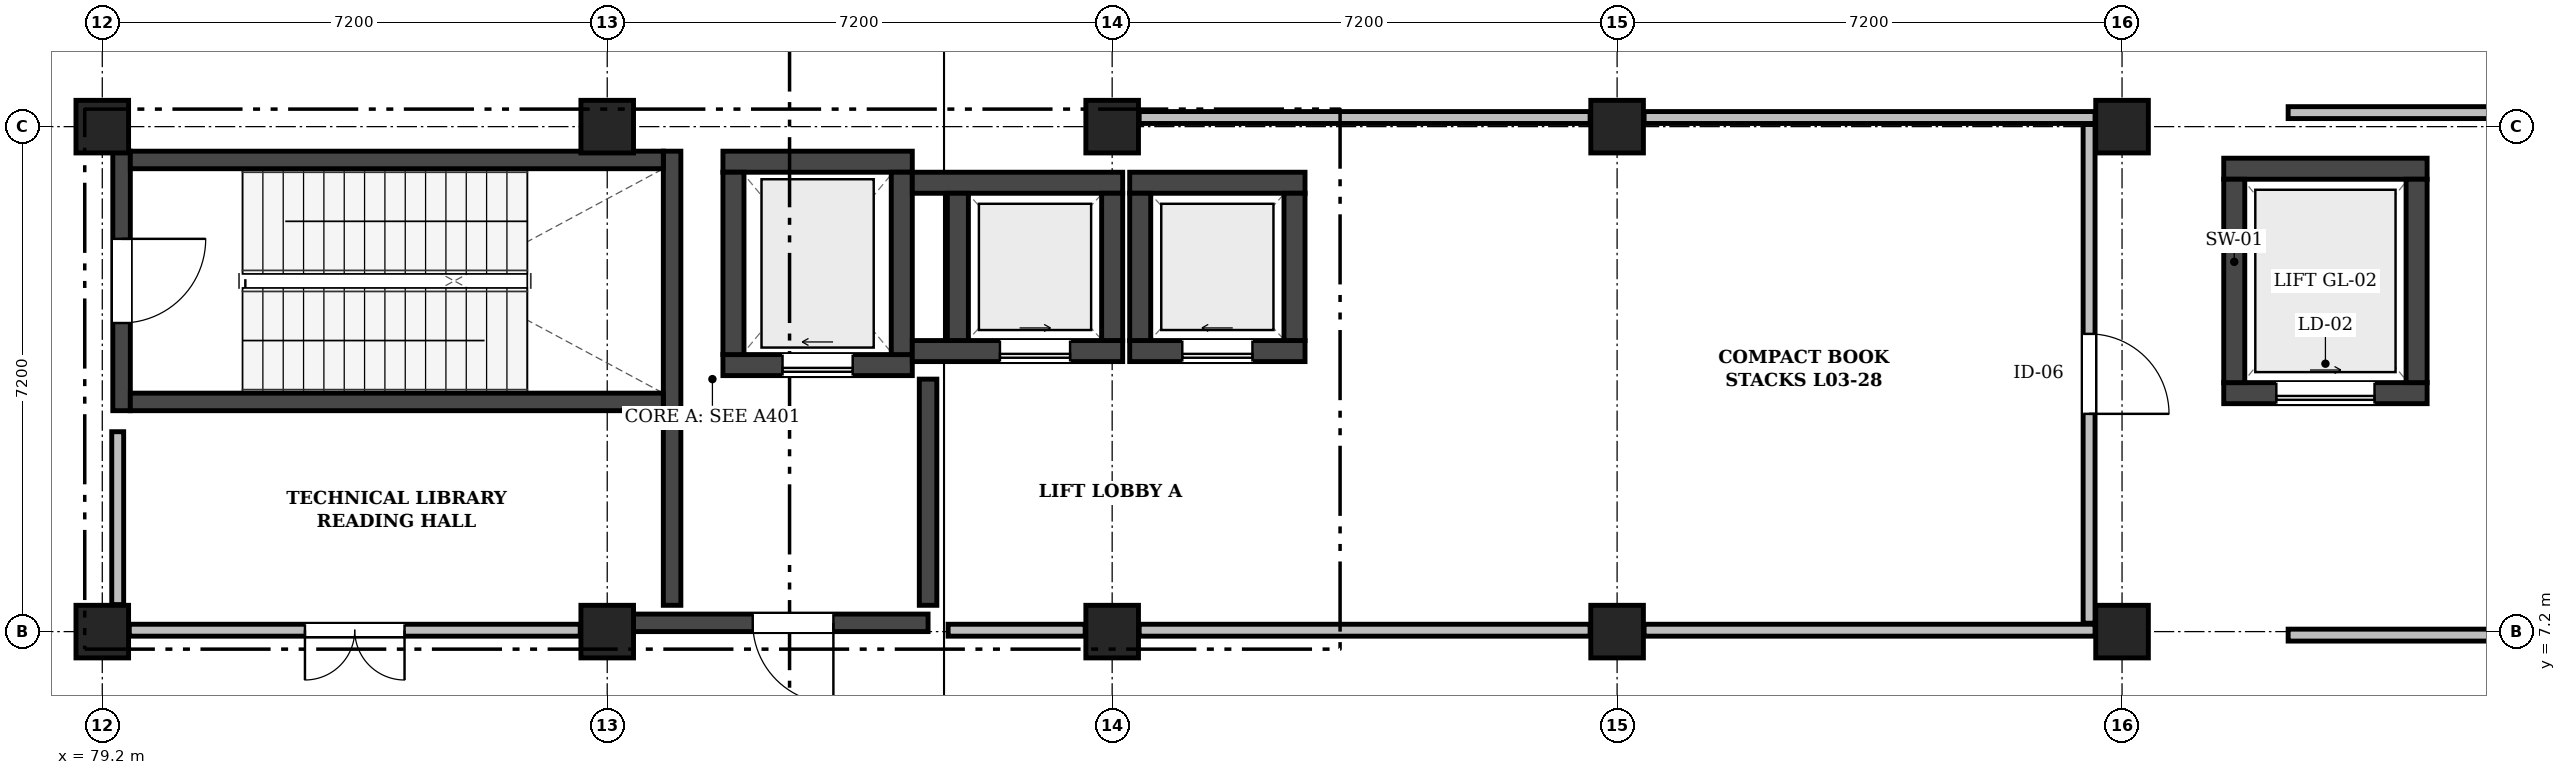
"""IFC4 building model, lengths in metres.
Left out: names, types, materials, properties, quantities, classifications, styles, units other than length and angle.
Written with IfcOpenShell. Run it as: python <this file> out.ifc"""

import sys

from ifc_helpers import new_model, si_unit, direction, frame, frame_2d, origin, origin_2d, place, context, subcontext, project, spatial, rectangle, extrude, element, fill, save


model = new_model("IFC4")
c1 = context("Model", 3, precision=1e-05, world=origin(), true_north=direction((0.0, 1.0)))
c2 = subcontext(c1, "Body", "Model", "MODEL_VIEW")
j1 = project(units=[si_unit("LENGTHUNIT", "METRE"), si_unit("PLANEANGLEUNIT", "RADIAN")], contexts=[c1])
p1 = place(None, origin())
s1 = spatial("IfcSite", under=j1, at=p1, CompositionType="ELEMENT")
p2 = place(p1, origin())
s2 = spatial("IfcBuilding", under=s1, at=p2, CompositionType="ELEMENT")
p3 = place(p2, frame((0.0, 0.0, 14.4)))
s3 = spatial("IfcBuildingStorey", under=s2, at=p3, CompositionType="ELEMENT", Elevation=14.4)
for number, where, z_axis, x_axis in (
    (1, (79.2, 7.2, 0.0), (0.0, 0.0, 1.0), (1.0, 0.0, 0.0)),
    (2, (79.2, 14.4, 0.0), (0.0, 0.0, 1.0), (1.0, 0.0, 0.0)),
    (3, (86.4, 7.2, 0.0), (0.0, 0.0, 1.0), (1.0, 0.0, 0.0)),
    (4, (86.4, 14.4, 0.0), (0.0, 0.0, 1.0), (1.0, 0.0, 0.0)),
    (5, (93.6, 7.2, 0.0), (0.0, 0.0, 1.0), (1.0, 0.0, 0.0)),
    (6, (93.6, 14.4, 0.0), (0.0, 0.0, 1.0), (1.0, 0.0, 0.0)),
    (7, (100.8, 7.2, 0.0), (0.0, 0.0, 1.0), (1.0, 0.0, 0.0)),
    (8, (100.8, 14.4, 0.0), (0.0, 0.0, 1.0), (1.0, 0.0, 0.0)),
    (9, (108.0, 7.2, 0.0), (0.0, 0.0, 1.0), (1.0, 0.0, 0.0)),
    (10, (108.0, 14.4, 0.0), (0.0, 0.0, 1.0), (1.0, 0.0, 0.0)),
):
    element("IfcColumn", number, at=place(p3, frame(where, z_axis=z_axis, x_axis=x_axis)), inside=s3, PredefinedType="COLUMN", context=c2, shape_type="SweptSolid", body=[
        extrude(rectangle(XDim=0.75, YDim=0.75, at=origin_2d()), origin(), (0.0, 0.0, 1.0), 4.5),
    ])
p4 = place(p3, frame((88.05, 11.0, 0.0), z_axis=(0.0, 0.0, 1.0), x_axis=(1.0, 0.0, 0.0)))
e11 = element("IfcWall", 11, at=p4, inside=s3, PredefinedType="SHEAR", context=c2, shape_type="SweptSolid", body=[
    extrude(rectangle(XDim=2.7, YDim=0.3, at=frame_2d((1.35, 0.0))), origin(), (0.0, 0.0, 1.0), 4.25),
])
p5 = place(p4, frame((0.85, 0.0, 0.0)))
e12 = element("IfcOpeningElement", 12, at=p5, cuts=e11, PredefinedType="OPENING", context=c2, shape_type="SweptSolid", body=[
    extrude(rectangle(XDim=1.0, YDim=2.1, at=frame_2d((0.5, 1.05))), frame((0.0, 0.162, 0.0), z_axis=(0.0, -1.0, 0.0), x_axis=(1.0, 0.0, 0.0)), (0.0, 0.0, 1.0), 0.324),
])
p6 = place(p3, frame((88.05, 13.9, 0.0), z_axis=(0.0, 0.0, 1.0), x_axis=(1.0, 0.0, 0.0)))
e13 = element("IfcWall", 13, at=p6, inside=s3, PredefinedType="SHEAR", context=c2, shape_type="SweptSolid", body=[
    extrude(rectangle(XDim=2.7, YDim=0.3, at=frame_2d((1.35, 0.0))), origin(), (0.0, 0.0, 1.0), 4.25),
])
for number, where, z_axis, x_axis in (
    (14, (88.2, 11.15, 0.0), (0.0, 0.0, 1.0), (0.0, 1.0, 0.0)),
    (15, (90.6, 11.15, 0.0), (0.0, 0.0, 1.0), (0.0, 1.0, 0.0)),
):
    element("IfcWall", number, at=place(p3, frame(where, z_axis=z_axis, x_axis=x_axis)), inside=s3, PredefinedType="SHEAR", context=c2, shape_type="SweptSolid", body=[
        extrude(rectangle(XDim=2.6, YDim=0.3, at=frame_2d((1.3, 0.0))), origin(), (0.0, 0.0, 1.0), 4.25),
    ])
p7 = place(p3, frame((90.75, 11.2, 0.0), z_axis=(0.0, 0.0, 1.0), x_axis=(1.0, 0.0, 0.0)))
e16 = element("IfcWall", 16, at=p7, inside=s3, PredefinedType="SHEAR", context=c2, shape_type="SweptSolid", body=[
    extrude(rectangle(XDim=3.0, YDim=0.3, at=frame_2d((1.5, 0.0))), origin(), (0.0, 0.0, 1.0), 4.25),
])
p8 = place(p7, frame((1.25, 0.0, 0.0)))
e17 = element("IfcOpeningElement", 17, at=p8, cuts=e16, PredefinedType="OPENING", context=c2, shape_type="SweptSolid", body=[
    extrude(rectangle(XDim=1.0, YDim=2.1, at=frame_2d((0.5, 1.05))), frame((0.0, 0.162, 0.0), z_axis=(0.0, -1.0, 0.0), x_axis=(1.0, 0.0, 0.0)), (0.0, 0.0, 1.0), 0.324),
])
p9 = place(p3, frame((90.75, 13.6, 0.0), z_axis=(0.0, 0.0, 1.0), x_axis=(1.0, 0.0, 0.0)))
e18 = element("IfcWall", 18, at=p9, inside=s3, PredefinedType="SHEAR", context=c2, shape_type="SweptSolid", body=[
    extrude(rectangle(XDim=3.0, YDim=0.3, at=frame_2d((1.5, 0.0))), origin(), (0.0, 0.0, 1.0), 4.25),
])
for number, where, z_axis, x_axis in (
    (19, (91.4, 11.35, 0.0), (0.0, 0.0, 1.0), (0.0, 1.0, 0.0)),
    (20, (93.6, 11.35, 0.0), (0.0, 0.0, 1.0), (0.0, 1.0, 0.0)),
):
    element("IfcWall", number, at=place(p3, frame(where, z_axis=z_axis, x_axis=x_axis)), inside=s3, PredefinedType="SHEAR", context=c2, shape_type="SweptSolid", body=[
        extrude(rectangle(XDim=2.1, YDim=0.3, at=frame_2d((1.05, 0.0))), origin(), (0.0, 0.0, 1.0), 4.25),
    ])
p10 = place(p3, frame((93.85, 11.2, 0.0), z_axis=(0.0, 0.0, 1.0), x_axis=(1.0, 0.0, 0.0)))
e21 = element("IfcWall", 21, at=p10, inside=s3, PredefinedType="SHEAR", context=c2, shape_type="SweptSolid", body=[
    extrude(rectangle(XDim=2.5, YDim=0.3, at=frame_2d((1.25, 0.0))), origin(), (0.0, 0.0, 1.0), 4.25),
])
p11 = place(p10, frame((0.75, 0.0, 0.0)))
e22 = element("IfcOpeningElement", 22, at=p11, cuts=e21, PredefinedType="OPENING", context=c2, shape_type="SweptSolid", body=[
    extrude(rectangle(XDim=1.0, YDim=2.1, at=frame_2d((0.5, 1.05))), frame((0.0, 0.162, 0.0), z_axis=(0.0, -1.0, 0.0), x_axis=(1.0, 0.0, 0.0)), (0.0, 0.0, 1.0), 0.324),
])
p12 = place(p3, frame((93.85, 13.6, 0.0), z_axis=(0.0, 0.0, 1.0), x_axis=(1.0, 0.0, 0.0)))
e23 = element("IfcWall", 23, at=p12, inside=s3, PredefinedType="SHEAR", context=c2, shape_type="SweptSolid", body=[
    extrude(rectangle(XDim=2.5, YDim=0.3, at=frame_2d((1.25, 0.0))), origin(), (0.0, 0.0, 1.0), 4.25),
])
for number, where, z_axis, x_axis in (
    (24, (94.0, 11.35, 0.0), (0.0, 0.0, 1.0), (0.0, 1.0, 0.0)),
    (25, (96.2, 11.35, 0.0), (0.0, 0.0, 1.0), (0.0, 1.0, 0.0)),
):
    element("IfcWall", number, at=place(p3, frame(where, z_axis=z_axis, x_axis=x_axis)), inside=s3, PredefinedType="SHEAR", context=c2, shape_type="SweptSolid", body=[
        extrude(rectangle(XDim=2.1, YDim=0.3, at=frame_2d((1.05, 0.0))), origin(), (0.0, 0.0, 1.0), 4.25),
    ])
p13 = place(p3, frame((109.45, 10.6, 0.0), z_axis=(0.0, 0.0, 1.0), x_axis=(1.0, 0.0, 0.0)))
e26 = element("IfcWall", 26, at=p13, inside=s3, PredefinedType="SHEAR", context=c2, shape_type="SweptSolid", body=[
    extrude(rectangle(XDim=2.9, YDim=0.3, at=frame_2d((1.45, 0.0))), origin(), (0.0, 0.0, 1.0), 4.25),
])
p14 = place(p13, frame((0.75, 0.0, 0.0)))
e27 = element("IfcOpeningElement", 27, at=p14, cuts=e26, PredefinedType="OPENING", context=c2, shape_type="SweptSolid", body=[
    extrude(rectangle(XDim=1.4, YDim=2.2, at=frame_2d((0.7, 1.1))), frame((0.0, 0.162, 0.0), z_axis=(0.0, -1.0, 0.0), x_axis=(1.0, 0.0, 0.0)), (0.0, 0.0, 1.0), 0.324),
])
p15 = place(p3, frame((109.45, 13.8, 0.0), z_axis=(0.0, 0.0, 1.0), x_axis=(1.0, 0.0, 0.0)))
e28 = element("IfcWall", 28, at=p15, inside=s3, PredefinedType="SHEAR", context=c2, shape_type="SweptSolid", body=[
    extrude(rectangle(XDim=2.9, YDim=0.3, at=frame_2d((1.45, 0.0))), origin(), (0.0, 0.0, 1.0), 4.25),
])
for number, where, z_axis, x_axis in (
    (29, (109.6, 10.75, 0.0), (0.0, 0.0, 1.0), (0.0, 1.0, 0.0)),
    (30, (112.2, 10.75, 0.0), (0.0, 0.0, 1.0), (0.0, 1.0, 0.0)),
):
    element("IfcWall", number, at=place(p3, frame(where, z_axis=z_axis, x_axis=x_axis)), inside=s3, PredefinedType="SHEAR", context=c2, shape_type="SweptSolid", body=[
        extrude(rectangle(XDim=2.9, YDim=0.3, at=frame_2d((1.45, 0.0))), origin(), (0.0, 0.0, 1.0), 4.25),
    ])
p16 = place(p3, frame((79.475, 10.35, 0.0), z_axis=(0.0, 0.0, 1.0), x_axis=(0.0, 1.0, 0.0)))
e31 = element("IfcWall", 31, at=p16, inside=s3, PredefinedType="SHEAR", context=c2, shape_type="SweptSolid", body=[
    extrude(rectangle(XDim=3.7, YDim=0.25, at=frame_2d((1.85, 0.0))), origin(), (0.0, 0.0, 1.0), 4.25),
])
p17 = place(p16, frame((1.25, 0.0, 0.0)))
e32 = element("IfcOpeningElement", 32, at=p17, cuts=e31, PredefinedType="OPENING", context=c2, shape_type="SweptSolid", body=[
    extrude(rectangle(XDim=1.2, YDim=2.15, at=frame_2d((0.6, 1.075))), frame((0.0, 0.137, 0.0), z_axis=(0.0, -1.0, 0.0), x_axis=(1.0, 0.0, 0.0)), (0.0, 0.0, 1.0), 0.274),
])
p18 = place(p3, frame((87.325, 10.35, 0.0), z_axis=(0.0, 0.0, 1.0), x_axis=(0.0, 1.0, 0.0)))
e33 = element("IfcWall", 33, at=p18, inside=s3, PredefinedType="SHEAR", context=c2, shape_type="SweptSolid", body=[
    extrude(rectangle(XDim=3.7, YDim=0.25, at=frame_2d((1.85, 0.0))), origin(), (0.0, 0.0, 1.0), 4.25),
])
for number, where, z_axis, x_axis in (
    (34, (79.6, 10.475, 0.0), (0.0, 0.0, 1.0), (1.0, 0.0, 0.0)),
    (35, (79.6, 13.925, 0.0), (0.0, 0.0, 1.0), (1.0, 0.0, 0.0)),
):
    element("IfcWall", number, at=place(p3, frame(where, z_axis=z_axis, x_axis=x_axis)), inside=s3, PredefinedType="SHEAR", context=c2, shape_type="SweptSolid", body=[
        extrude(rectangle(XDim=7.6, YDim=0.25, at=frame_2d((3.8, 0.0))), origin(), (0.0, 0.0, 1.0), 4.25),
    ])
p19 = place(p3, frame((86.775, 7.325, 0.0), z_axis=(0.0, 0.0, 1.0), x_axis=(1.0, 0.0, 0.0)))
e36 = element("IfcWall", 36, at=p19, inside=s3, PredefinedType="SHEAR", context=c2, shape_type="SweptSolid", body=[
    extrude(rectangle(XDim=4.2, YDim=0.25, at=frame_2d((2.1, 0.0))), origin(), (0.0, 0.0, 1.0), 4.25),
])
p20 = place(p19, frame((1.7, 0.0, 0.0)))
e37 = element("IfcOpeningElement", 37, at=p20, cuts=e36, PredefinedType="OPENING", context=c2, shape_type="SweptSolid", body=[
    extrude(rectangle(XDim=1.15, YDim=2.15, at=frame_2d((0.575, 1.075))), frame((0.0, 0.137, 0.0), z_axis=(0.0, -1.0, 0.0), x_axis=(1.0, 0.0, 0.0)), (0.0, 0.0, 1.0), 0.274),
])
p21 = place(p3, frame((87.325, 7.575, 0.0), z_axis=(0.0, 0.0, 1.0), x_axis=(0.0, 1.0, 0.0)))
e38 = element("IfcWall", 38, at=p21, inside=s3, PredefinedType="SHEAR", context=c2, shape_type="SweptSolid", body=[
    extrude(rectangle(XDim=2.77, YDim=0.25, at=frame_2d((1.385, 0.0))), origin(), (0.0, 0.0, 1.0), 4.25),
])
p22 = place(p3, frame((90.975, 7.575, 0.0), z_axis=(0.0, 0.0, 1.0), x_axis=(0.0, 1.0, 0.0)))
e39 = element("IfcWall", 39, at=p22, inside=s3, PredefinedType="SHEAR", context=c2, shape_type="SweptSolid", body=[
    extrude(rectangle(XDim=3.225, YDim=0.25, at=frame_2d((1.613, 0.0))), origin(), (0.0, 0.0, 1.0), 4.25),
])
p23 = place(p3, frame((110.368, 14.6, 0.0), z_axis=(0.0, 0.0, 1.0), x_axis=(1.0, 0.0, 0.0)))
e40 = element("IfcWall", 40, at=p23, inside=s3, PredefinedType="PARTITIONING", context=c2, shape_type="SweptSolid", body=[
    extrude(rectangle(XDim=4.68, YDim=0.17, at=frame_2d((2.34, 0.0))), origin(), (0.0, 0.0, 1.0), 2.78),
])
for number, where, z_axis, x_axis in (
    (41, (93.985, 14.53, 0.0), (0.0, 0.0, 1.0), (1.0, 0.0, 0.0)),
    (42, (101.185, 14.53, 0.0), (0.0, 0.0, 1.0), (1.0, 0.0, 0.0)),
):
    element("IfcWall", number, at=place(p3, frame(where, z_axis=z_axis, x_axis=x_axis)), inside=s3, PredefinedType="PARTITIONING", context=c2, shape_type="SweptSolid", body=[
        extrude(rectangle(XDim=6.43, YDim=0.17, at=frame_2d((3.215, 0.0))), origin(), (0.0, 0.0, 1.0), 3.7),
    ])
p24 = place(p3, frame((79.42, 7.585, 0.0), z_axis=(0.0, 0.0, 1.0), x_axis=(0.0, 1.0, 0.0)))
e43 = element("IfcWall", 43, at=p24, inside=s3, PredefinedType="PARTITIONING", context=c2, shape_type="SweptSolid", body=[
    extrude(rectangle(XDim=2.465, YDim=0.17, at=frame_2d((1.233, 0.0))), origin(), (0.0, 0.0, 1.0), 3.73),
])
p25 = place(p3, frame((110.368, 7.15, 0.0), z_axis=(0.0, 0.0, 1.0), x_axis=(1.0, 0.0, 0.0)))
e44 = element("IfcWall", 44, at=p25, inside=s3, PredefinedType="PARTITIONING", context=c2, shape_type="SweptSolid", body=[
    extrude(rectangle(XDim=4.709, YDim=0.17, at=frame_2d((2.355, 0.0))), origin(), (0.0, 0.0, 1.0), 2.78),
])
p26 = place(p3, frame((79.585, 7.22, 0.0), z_axis=(0.0, 0.0, 1.0), x_axis=(1.0, 0.0, 0.0)))
e45 = element("IfcWall", 45, at=p26, inside=s3, PredefinedType="PARTITIONING", context=c2, shape_type="SweptSolid", body=[
    extrude(rectangle(XDim=6.43, YDim=0.17, at=frame_2d((3.215, 0.0))), origin(), (0.0, 0.0, 1.0), 3.7),
])
p27 = place(p26, frame((2.505, 0.0, 0.0)))
e46 = element("IfcOpeningElement", 46, at=p27, cuts=e45, PredefinedType="OPENING", context=c2, shape_type="SweptSolid", body=[
    extrude(rectangle(XDim=1.42, YDim=2.24, at=frame_2d((0.71, 1.12))), frame((0.0, 0.097, 0.0), z_axis=(0.0, -1.0, 0.0), x_axis=(1.0, 0.0, 0.0)), (0.0, 0.0, 1.0), 0.194),
])
p28 = place(p3, frame((91.261, 7.22, 0.0), z_axis=(0.0, 0.0, 1.0), x_axis=(1.0, 0.0, 0.0)))
e47 = element("IfcWall", 47, at=p28, inside=s3, PredefinedType="PARTITIONING", context=c2, shape_type="SweptSolid", body=[
    extrude(rectangle(XDim=1.954, YDim=0.17, at=frame_2d((0.977, 0.0))), origin(), (0.0, 0.0, 1.0), 3.7),
])
for number, where, z_axis, x_axis in (
    (48, (93.985, 7.22, 0.0), (0.0, 0.0, 1.0), (1.0, 0.0, 0.0)),
    (49, (101.185, 7.22, 0.0), (0.0, 0.0, 1.0), (1.0, 0.0, 0.0)),
):
    element("IfcWall", number, at=place(p3, frame(where, z_axis=z_axis, x_axis=x_axis)), inside=s3, PredefinedType="PARTITIONING", context=c2, shape_type="SweptSolid", body=[
        extrude(rectangle(XDim=6.43, YDim=0.17, at=frame_2d((3.215, 0.0))), origin(), (0.0, 0.0, 1.0), 3.7),
    ])
p29 = place(p3, frame((107.53, 7.32, 0.0), z_axis=(0.0, 0.0, 1.0), x_axis=(0.0, 1.0, 0.0)))
e50 = element("IfcWall", 50, at=p29, inside=s3, PredefinedType="PARTITIONING", context=c2, shape_type="SweptSolid", body=[
    extrude(rectangle(XDim=7.11, YDim=0.17, at=frame_2d((3.555, 0.0))), origin(), (0.0, 0.0, 1.0), 4.16),
])
p30 = place(p29, frame((2.985, 0.0, 0.0)))
e51 = element("IfcOpeningElement", 51, at=p30, cuts=e50, PredefinedType="OPENING", context=c2, shape_type="SweptSolid", body=[
    extrude(rectangle(XDim=1.14, YDim=2.2, at=frame_2d((0.57, 1.1))), frame((0.0, 0.097, 0.0), z_axis=(0.0, -1.0, 0.0), x_axis=(1.0, 0.0, 0.0)), (0.0, 0.0, 1.0), 0.194),
])
p31 = place(p5, frame((1.0, 0.0, 0.0), z_axis=(0.0, 0.0, 1.0), x_axis=(-1.0, 0.0, 0.0)))
e52 = element("IfcDoor", 52, at=p31, inside=s3, OperationType="SLIDING_TO_LEFT", PredefinedType="DOOR", context=c2, shape_type="SweptSolid", body=[
    extrude(rectangle(XDim=1.0, YDim=2.1, at=frame_2d((0.5, 1.05))), frame((0.0, 0.025, 0.0), z_axis=(0.0, -1.0, 0.0), x_axis=(1.0, 0.0, 0.0)), (0.0, 0.0, 1.0), 0.05),
])
fill(e12, e52)
p32 = place(p8, frame((1.0, 0.0, 0.0), z_axis=(0.0, 0.0, 1.0), x_axis=(-1.0, 0.0, 0.0)))
e53 = element("IfcDoor", 53, at=p32, inside=s3, OperationType="SLIDING_TO_RIGHT", PredefinedType="DOOR", context=c2, shape_type="SweptSolid", body=[
    extrude(rectangle(XDim=1.0, YDim=2.1, at=frame_2d((0.5, 1.05))), frame((0.0, 0.025, 0.0), z_axis=(0.0, -1.0, 0.0), x_axis=(1.0, 0.0, 0.0)), (0.0, 0.0, 1.0), 0.05),
])
fill(e17, e53)
p33 = place(p11, frame((1.0, 0.0, 0.0), z_axis=(0.0, 0.0, 1.0), x_axis=(-1.0, 0.0, 0.0)))
e54 = element("IfcDoor", 54, at=p33, inside=s3, OperationType="SLIDING_TO_LEFT", PredefinedType="DOOR", context=c2, shape_type="SweptSolid", body=[
    extrude(rectangle(XDim=1.0, YDim=2.1, at=frame_2d((0.5, 1.05))), frame((0.0, 0.025, 0.0), z_axis=(0.0, -1.0, 0.0), x_axis=(1.0, 0.0, 0.0)), (0.0, 0.0, 1.0), 0.05),
])
fill(e22, e54)
p34 = place(p14, frame((1.4, 0.0, 0.0), z_axis=(0.0, 0.0, 1.0), x_axis=(-1.0, 0.0, 0.0)))
e55 = element("IfcDoor", 55, at=p34, inside=s3, OperationType="SLIDING_TO_RIGHT", PredefinedType="DOOR", context=c2, shape_type="SweptSolid", body=[
    extrude(rectangle(XDim=1.4, YDim=2.2, at=frame_2d((0.7, 1.1))), frame((0.0, 0.025, 0.0), z_axis=(0.0, -1.0, 0.0), x_axis=(1.0, 0.0, 0.0)), (0.0, 0.0, 1.0), 0.05),
])
fill(e27, e55)
p35 = place(p17, frame((1.2, 0.0, 0.0), z_axis=(0.0, 0.0, 1.0), x_axis=(-1.0, 0.0, 0.0)))
e56 = element("IfcDoor", 56, at=p35, inside=s3, OperationType="SINGLE_SWING_LEFT", PredefinedType="DOOR", context=c2, shape_type="SweptSolid", body=[
    extrude(rectangle(XDim=1.2, YDim=2.15, at=frame_2d((0.6, 1.075))), frame((0.0, 0.025, 0.0), z_axis=(0.0, -1.0, 0.0), x_axis=(1.0, 0.0, 0.0)), (0.0, 0.0, 1.0), 0.05),
])
fill(e32, e56)
p36 = place(p20, frame((1.15, 0.0, 0.0), z_axis=(0.0, 0.0, 1.0), x_axis=(-1.0, 0.0, 0.0)))
e57 = element("IfcDoor", 57, at=p36, inside=s3, OperationType="SINGLE_SWING_LEFT", PredefinedType="DOOR", context=c2, shape_type="SweptSolid", body=[
    extrude(rectangle(XDim=1.15, YDim=2.15, at=frame_2d((0.575, 1.075))), frame((0.0, 0.025, 0.0), z_axis=(0.0, -1.0, 0.0), x_axis=(1.0, 0.0, 0.0)), (0.0, 0.0, 1.0), 0.05),
])
fill(e37, e57)
p37 = place(p30, frame((1.14, 0.0, 0.0), z_axis=(0.0, 0.0, 1.0), x_axis=(-1.0, 0.0, 0.0)))
e58 = element("IfcDoor", 58, at=p37, inside=s3, OperationType="SINGLE_SWING_RIGHT", PredefinedType="DOOR", context=c2, shape_type="SweptSolid", body=[
    extrude(rectangle(XDim=1.14, YDim=2.2, at=frame_2d((0.57, 1.1))), frame((0.0, 0.025, 0.0), z_axis=(0.0, -1.0, 0.0), x_axis=(1.0, 0.0, 0.0)), (0.0, 0.0, 1.0), 0.05),
])
fill(e51, e58)
p38 = place(p27, frame((1.42, 0.0, 0.0), z_axis=(0.0, 0.0, 1.0), x_axis=(-1.0, 0.0, 0.0)))
e59 = element("IfcDoor", 59, at=p38, inside=s3, OperationType="DOUBLE_DOOR_SINGLE_SWING", PredefinedType="DOOR", context=c2, shape_type="SweptSolid", body=[
    extrude(rectangle(XDim=1.42, YDim=2.24, at=frame_2d((0.71, 1.12))), frame((0.0, 0.025, 0.0), z_axis=(0.0, -1.0, 0.0), x_axis=(1.0, 0.0, 0.0)), (0.0, 0.0, 1.0), 0.05),
])
fill(e46, e59)
save(model, sys.argv[1])
